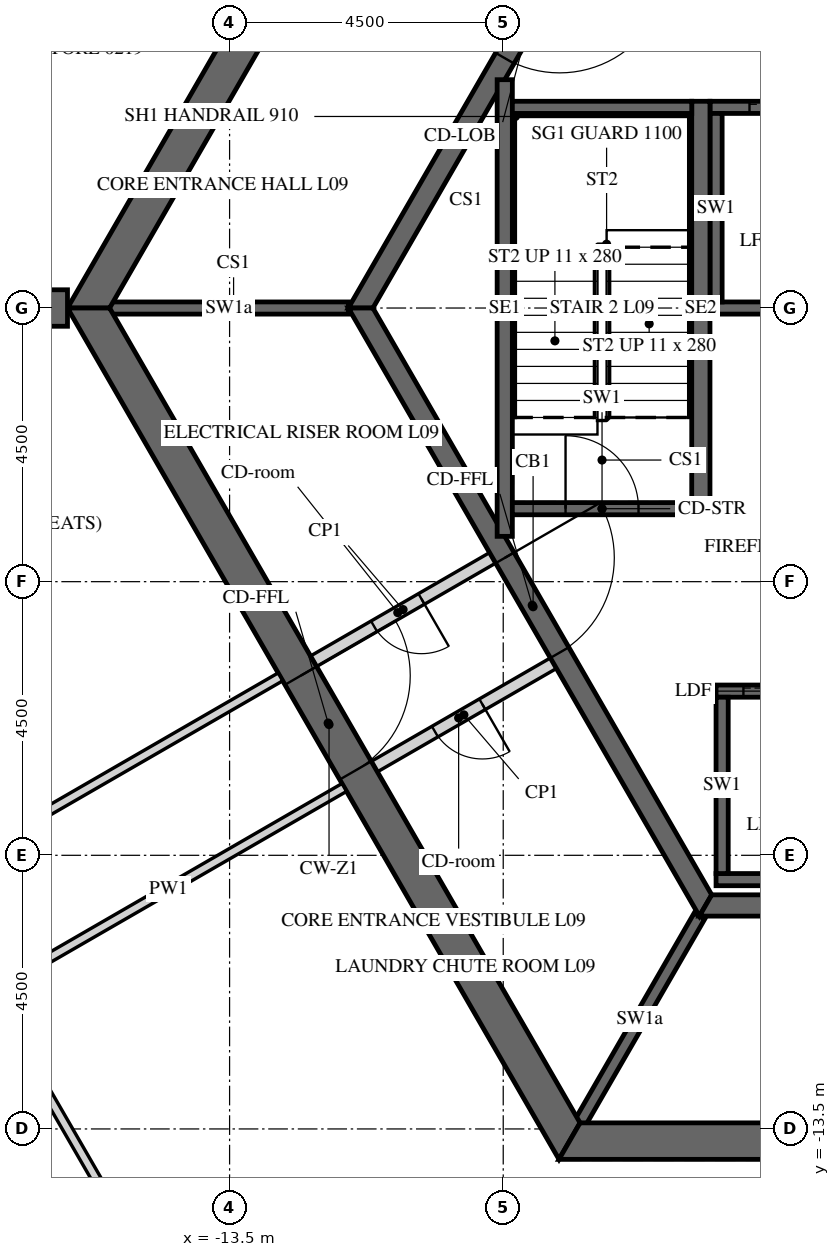
"""IFC4 building model, lengths in metres.
Left out: names, types, materials, properties, quantities, classifications, styles, units other than length and angle.
Written with IfcOpenShell. Run it as: python <this file> out.ifc"""

import sys

from ifc_helpers import new_model, si_unit, direction, frame, frame_2d, origin, place, context, subcontext, project, spatial, polyline, rectangle, outline, extrude, element, fill, save


model = new_model("IFC4")
c1 = context("Model", 3, precision=1e-05, world=origin(), true_north=direction((0.0, 1.0)))
c2 = subcontext(c1, "Body", "Model", "MODEL_VIEW")
j1 = project(units=[si_unit("LENGTHUNIT", "METRE"), si_unit("PLANEANGLEUNIT", "RADIAN")], contexts=[c1])
p1 = place(None, origin())
s1 = spatial("IfcSite", under=j1, at=p1, CompositionType="ELEMENT")
p2 = place(p1, origin())
s2 = spatial("IfcBuilding", under=s1, at=p2, CompositionType="ELEMENT")
p3 = place(p2, frame((0.0, 0.0, 49.2)))
s3 = spatial("IfcBuildingStorey", under=s2, at=p3, CompositionType="ELEMENT", Elevation=49.2)
p4 = place(p3, frame((-7.91, 13.7, -0.15), z_axis=(0.0, 0.0, 1.0), x_axis=(-0.499999880136, -0.866025472988, 0.0)))
e1 = element("IfcWall", 1, at=p4, inside=s3, PredefinedType="SHEAR", context=c2, shape_type="SweptSolid", body=[
    extrude(outline(polyline([(-0.173, -0.3), (15.993, -0.3), (15.646, 0.3), (0.173, 0.3), (-0.173, -0.3)])), origin(), (0.0, 0.0, 1.0), 3.9),
])
p5 = place(p4, frame((7.039, 0.0, 0.15)))
e2 = element("IfcOpeningElement", 2, at=p5, cuts=e1, PredefinedType="OPENING", context=c2, shape_type="SweptSolid", body=[
    extrude(rectangle(XDim=1.8, YDim=2.4, at=frame_2d((0.9, 1.2))), frame((0.0, 0.31, 0.0), z_axis=(0.0, -1.0, 0.0), x_axis=(1.0, 0.0, 0.0)), (0.0, 0.0, 1.0), 0.62),
])
p6 = place(p3, frame((-15.819, 0.0, -0.15), z_axis=(0.0, 0.0, 1.0), x_axis=(0.499999880136, -0.866025472988, 0.0)))
e3 = element("IfcWall", 3, at=p6, inside=s3, PredefinedType="SHEAR", context=c2, shape_type="SweptSolid", body=[
    extrude(outline(polyline([(-0.173, -0.3), (15.993, -0.3), (15.646, 0.3), (0.173, 0.3), (-0.173, -0.3)])), origin(), (0.0, 0.0, 1.0), 3.9),
])
p7 = place(p6, frame((6.981, 0.0, 0.15)))
e4 = element("IfcOpeningElement", 4, at=p7, cuts=e3, PredefinedType="OPENING", context=c2, shape_type="SweptSolid", body=[
    extrude(rectangle(XDim=1.8, YDim=2.4, at=frame_2d((0.9, 1.2))), frame((0.0, 0.31, 0.0), z_axis=(0.0, -1.0, 0.0), x_axis=(1.0, 0.0, 0.0)), (0.0, 0.0, 1.0), 0.62),
])
p8 = place(p3, frame((-7.91, -13.7, -0.15), z_axis=(0.0, 0.0, 1.0), x_axis=(1.0, 0.0, 0.0)))
e5 = element("IfcWall", 5, at=p8, inside=s3, PredefinedType="SHEAR", context=c2, shape_type="SweptSolid", body=[
    extrude(outline(polyline([(-0.173, -0.3), (15.993, -0.3), (15.646, 0.3), (0.173, 0.3), (-0.173, -0.3)])), origin(), (0.0, 0.0, 1.0), 3.9),
])
p9 = place(p8, frame((7.31, 0.0, 0.15)))
e6 = element("IfcOpeningElement", 6, at=p9, cuts=e5, PredefinedType="OPENING", context=c2, shape_type="SweptSolid", body=[
    extrude(rectangle(XDim=1.2, YDim=2.4, at=frame_2d((0.6, 1.2))), frame((0.0, 0.31, 0.0), z_axis=(0.0, -1.0, 0.0), x_axis=(1.0, 0.0, 0.0)), (0.0, 0.0, 1.0), 0.62),
])
p10 = place(p3, frame((-16.166, 0.0, -0.15), z_axis=(0.0, 0.0, 1.0), x_axis=(-1.0, 0.0, 0.0)))
e7 = element("IfcWall", 7, at=p10, inside=s3, PredefinedType="SHEAR", context=c2, shape_type="SweptSolid", body=[
    extrude(rectangle(XDim=16.509, YDim=0.6, at=frame_2d((8.254, 0.0))), origin(), (0.0, 0.0, 1.0), 3.9),
])
p11 = place(p10, frame((7.354, 0.0, 0.15)))
e8 = element("IfcOpeningElement", 8, at=p11, cuts=e7, PredefinedType="OPENING", context=c2, shape_type="SweptSolid", body=[
    extrude(rectangle(XDim=1.8, YDim=2.4, at=frame_2d((0.9, 1.2))), frame((0.0, 0.31, 0.0), z_axis=(0.0, -1.0, 0.0), x_axis=(1.0, 0.0, 0.0)), (0.0, 0.0, 1.0), 0.62),
])
p12 = place(p3, frame((-5.673, 9.825, -0.15), z_axis=(0.0, 0.0, 1.0), x_axis=(-0.499995046907, -0.866028263435, 0.0)))
e9 = element("IfcWall", 9, at=p12, inside=s3, PredefinedType="SHEAR", context=c2, shape_type="SweptSolid", body=[
    extrude(outline(polyline([(-0.101, -0.175), (11.446, -0.175), (11.244, 0.175), (0.101, 0.175), (-0.101, -0.175)])), origin(), (0.0, 0.0, 1.0), 3.9),
])
p13 = place(p12, frame((4.801, 0.0, 0.15)))
e10 = element("IfcOpeningElement", 10, at=p13, cuts=e9, PredefinedType="OPENING", context=c2, shape_type="SweptSolid", body=[
    extrude(rectangle(XDim=1.8, YDim=2.4, at=frame_2d((0.9, 1.2))), frame((0.0, 0.185, 0.0), z_axis=(0.0, -1.0, 0.0), x_axis=(1.0, 0.0, 0.0)), (0.0, 0.0, 1.0), 0.37),
])
p14 = place(p3, frame((-11.345, 0.0, -0.15), z_axis=(0.0, 0.0, 1.0), x_axis=(0.499995046907, -0.866028263435, 0.0)))
e11 = element("IfcWall", 11, at=p14, inside=s3, PredefinedType="SHEAR", context=c2, shape_type="SweptSolid", body=[
    extrude(outline(polyline([(-0.101, -0.175), (11.446, -0.175), (11.244, 0.175), (0.101, 0.175), (-0.101, -0.175)])), origin(), (0.0, 0.0, 1.0), 3.9),
])
p15 = place(p14, frame((4.744, 0.0, 0.15)))
e12 = element("IfcOpeningElement", 12, at=p15, cuts=e11, PredefinedType="OPENING", context=c2, shape_type="SweptSolid", body=[
    extrude(rectangle(XDim=1.8, YDim=2.4, at=frame_2d((0.9, 1.2))), frame((0.0, 0.185, 0.0), z_axis=(0.0, -1.0, 0.0), x_axis=(1.0, 0.0, 0.0)), (0.0, 0.0, 1.0), 0.37),
])
p16 = place(p3, frame((-5.673, -9.825, -0.15), z_axis=(0.0, 0.0, 1.0), x_axis=(1.0, 0.0, 0.0)))
e13 = element("IfcWall", 13, at=p16, inside=s3, PredefinedType="SHEAR", context=c2, shape_type="SweptSolid", body=[
    extrude(outline(polyline([(-0.101, -0.175), (11.446, -0.175), (11.244, 0.175), (0.101, 0.175), (-0.101, -0.175)])), origin(), (0.0, 0.0, 1.0), 3.9),
])
p17 = place(p3, frame((-5.6, 3.3, -0.25), z_axis=(0.0, 0.0, 1.0), x_axis=(1.0, 0.0, 0.0)))
e14 = element("IfcWall", 14, at=p17, inside=s3, PredefinedType="SHEAR", context=c2, shape_type="SweptSolid", body=[
    extrude(rectangle(XDim=11.2, YDim=0.2, at=frame_2d((5.6, 0.0))), origin(), (0.0, 0.0, 1.0), 3.9),
])
p18 = place(p17, frame((0.65, 0.0, 0.25)))
e15 = element("IfcOpeningElement", 15, at=p18, cuts=e14, PredefinedType="OPENING", context=c2, shape_type="SweptSolid", body=[
    extrude(rectangle(XDim=1.1, YDim=2.1, at=frame_2d((0.55, 1.05))), frame((0.0, 0.11, 0.0), z_axis=(0.0, -1.0, 0.0), x_axis=(1.0, 0.0, 0.0)), (0.0, 0.0, 1.0), 0.22),
])
p19 = place(p17, frame((2.85, 0.0, 0.25)))
e16 = element("IfcOpeningElement", 16, at=p19, cuts=e14, PredefinedType="OPENING", context=c2, shape_type="SweptSolid", body=[
    extrude(rectangle(XDim=1.1, YDim=2.1, at=frame_2d((0.55, 1.05))), frame((0.0, 0.11, 0.0), z_axis=(0.0, -1.0, 0.0), x_axis=(1.0, 0.0, 0.0)), (0.0, 0.0, 1.0), 0.22),
])
p20 = place(p17, frame((5.05, 0.0, 0.25)))
e17 = element("IfcOpeningElement", 17, at=p20, cuts=e14, PredefinedType="OPENING", context=c2, shape_type="SweptSolid", body=[
    extrude(rectangle(XDim=1.1, YDim=2.1, at=frame_2d((0.55, 1.05))), frame((0.0, 0.11, 0.0), z_axis=(0.0, -1.0, 0.0), x_axis=(1.0, 0.0, 0.0)), (0.0, 0.0, 1.0), 0.22),
])
p21 = place(p17, frame((7.25, 0.0, 0.25)))
e18 = element("IfcOpeningElement", 18, at=p21, cuts=e14, PredefinedType="OPENING", context=c2, shape_type="SweptSolid", body=[
    extrude(rectangle(XDim=1.1, YDim=2.1, at=frame_2d((0.55, 1.05))), frame((0.0, 0.11, 0.0), z_axis=(0.0, -1.0, 0.0), x_axis=(1.0, 0.0, 0.0)), (0.0, 0.0, 1.0), 0.22),
])
p22 = place(p17, frame((9.45, 0.0, 0.25)))
e19 = element("IfcOpeningElement", 19, at=p22, cuts=e14, PredefinedType="OPENING", context=c2, shape_type="SweptSolid", body=[
    extrude(rectangle(XDim=1.1, YDim=2.1, at=frame_2d((0.55, 1.05))), frame((0.0, 0.11, 0.0), z_axis=(0.0, -1.0, 0.0), x_axis=(1.0, 0.0, 0.0)), (0.0, 0.0, 1.0), 0.22),
])
p23 = place(p3, frame((-5.6, 0.0, -0.25), z_axis=(0.0, 0.0, 1.0), x_axis=(1.0, 0.0, 0.0)))
e20 = element("IfcWall", 20, at=p23, inside=s3, PredefinedType="SHEAR", context=c2, shape_type="SweptSolid", body=[
    extrude(rectangle(XDim=11.2, YDim=0.2, at=frame_2d((5.6, 0.0))), origin(), (0.0, 0.0, 1.0), 3.9),
])
p24 = place(p3, frame((-5.5, 0.1, -0.25), z_axis=(0.0, 0.0, 1.0), x_axis=(0.0, 1.0, 0.0)))
e21 = element("IfcWall", 21, at=p24, inside=s3, PredefinedType="SHEAR", context=c2, shape_type="SweptSolid", body=[
    extrude(rectangle(XDim=3.1, YDim=0.2, at=frame_2d((1.55, 0.0))), origin(), (0.0, 0.0, 1.0), 3.9),
])
p25 = place(p3, frame((-5.5, -6.3, -0.25), z_axis=(0.0, 0.0, 1.0), x_axis=(1.0, 0.0, 0.0)))
e22 = element("IfcWall", 22, at=p25, inside=s3, PredefinedType="SHEAR", context=c2, shape_type="SweptSolid", body=[
    extrude(rectangle(XDim=9.2, YDim=0.2, at=frame_2d((4.6, 0.0))), origin(), (0.0, 0.0, 1.0), 3.9),
])
p26 = place(p25, frame((0.45, 0.0, 0.25)))
e23 = element("IfcOpeningElement", 23, at=p26, cuts=e22, PredefinedType="OPENING", context=c2, shape_type="SweptSolid", body=[
    extrude(rectangle(XDim=1.1, YDim=2.1, at=frame_2d((0.55, 1.05))), frame((0.0, 0.11, 0.0), z_axis=(0.0, -1.0, 0.0), x_axis=(1.0, 0.0, 0.0)), (0.0, 0.0, 1.0), 0.22),
])
p27 = place(p25, frame((2.25, 0.0, 0.25)))
e24 = element("IfcOpeningElement", 24, at=p27, cuts=e22, PredefinedType="OPENING", context=c2, shape_type="SweptSolid", body=[
    extrude(rectangle(XDim=1.1, YDim=2.1, at=frame_2d((0.55, 1.05))), frame((0.0, 0.11, 0.0), z_axis=(0.0, -1.0, 0.0), x_axis=(1.0, 0.0, 0.0)), (0.0, 0.0, 1.0), 0.22),
])
p28 = place(p25, frame((4.05, 0.0, 0.25)))
e25 = element("IfcOpeningElement", 25, at=p28, cuts=e22, PredefinedType="OPENING", context=c2, shape_type="SweptSolid", body=[
    extrude(rectangle(XDim=1.1, YDim=2.1, at=frame_2d((0.55, 1.05))), frame((0.0, 0.11, 0.0), z_axis=(0.0, -1.0, 0.0), x_axis=(1.0, 0.0, 0.0)), (0.0, 0.0, 1.0), 0.22),
])
p29 = place(p25, frame((5.85, 0.0, 0.25)))
e26 = element("IfcOpeningElement", 26, at=p29, cuts=e22, PredefinedType="OPENING", context=c2, shape_type="SweptSolid", body=[
    extrude(rectangle(XDim=1.1, YDim=2.1, at=frame_2d((0.55, 1.05))), frame((0.0, 0.11, 0.0), z_axis=(0.0, -1.0, 0.0), x_axis=(1.0, 0.0, 0.0)), (0.0, 0.0, 1.0), 0.22),
])
p30 = place(p25, frame((7.65, 0.0, 0.25)))
e27 = element("IfcOpeningElement", 27, at=p30, cuts=e22, PredefinedType="OPENING", context=c2, shape_type="SweptSolid", body=[
    extrude(rectangle(XDim=1.1, YDim=2.1, at=frame_2d((0.55, 1.05))), frame((0.0, 0.11, 0.0), z_axis=(0.0, -1.0, 0.0), x_axis=(1.0, 0.0, 0.0)), (0.0, 0.0, 1.0), 0.22),
])
p31 = place(p3, frame((-5.5, -9.4, -0.25), z_axis=(0.0, 0.0, 1.0), x_axis=(1.0, 0.0, 0.0)))
e28 = element("IfcWall", 28, at=p31, inside=s3, PredefinedType="SHEAR", context=c2, shape_type="SweptSolid", body=[
    extrude(rectangle(XDim=9.2, YDim=0.2, at=frame_2d((4.6, 0.0))), origin(), (0.0, 0.0, 1.0), 3.9),
])
p32 = place(p3, frame((-5.4, -9.3, -0.25), z_axis=(0.0, 0.0, 1.0), x_axis=(0.0, 1.0, 0.0)))
e29 = element("IfcWall", 29, at=p32, inside=s3, PredefinedType="SHEAR", context=c2, shape_type="SweptSolid", body=[
    extrude(rectangle(XDim=2.9, YDim=0.2, at=frame_2d((1.45, 0.0))), origin(), (0.0, 0.0, 1.0), 3.9),
])
p33 = place(p3, frame((-11.547, 0.0, -0.15), z_axis=(0.0, 0.0, 1.0), x_axis=(-1.0, 0.0, 0.0)))
e30 = element("IfcWall", 30, at=p33, inside=s3, PredefinedType="SHEAR", context=c2, shape_type="SweptSolid", body=[
    extrude(rectangle(XDim=3.926, YDim=0.2, at=frame_2d((1.963, 0.0))), origin(), (0.0, 0.0, 1.0), 3.9),
])
p34 = place(p3, frame((-5.773, -10.0, -0.15), z_axis=(0.0, 0.0, 1.0), x_axis=(-0.500038251005, -0.86600331843, 0.0)))
e31 = element("IfcWall", 31, at=p34, inside=s3, PredefinedType="SHEAR", context=c2, shape_type="SweptSolid", body=[
    extrude(rectangle(XDim=3.926, YDim=0.2, at=frame_2d((1.963, 0.0))), origin(), (0.0, 0.0, 1.0), 3.9),
])
p35 = place(p3, frame((-8.175, -5.841, 0.0), z_axis=(0.0, 0.0, 1.0), x_axis=(-0.866020560687, -0.500008388397, 0.0)))
e32 = element("IfcWall", 32, at=p35, inside=s3, PredefinedType="PARTITIONING", context=c2, shape_type="SweptSolid", body=[
    extrude(rectangle(XDim=3.4, YDim=0.2, at=frame_2d((1.7, 0.0))), origin(), (0.0, 0.0, 1.0), 3.65),
])
p36 = place(p35, frame((1.35, 0.0, 0.0)))
e33 = element("IfcOpeningElement", 33, at=p36, cuts=e32, PredefinedType="OPENING", context=c2, shape_type="SweptSolid", body=[
    extrude(rectangle(XDim=0.9, YDim=2.1, at=frame_2d((0.45, 1.05))), frame((0.0, 0.11, 0.0), z_axis=(0.0, -1.0, 0.0), x_axis=(1.0, 0.0, 0.0)), (0.0, 0.0, 1.0), 0.22),
])
p37 = place(p3, frame((-9.175, -4.109, 0.0), z_axis=(0.0, 0.0, 1.0), x_axis=(-0.865989465428, -0.500062241894, 0.0)))
e34 = element("IfcWall", 34, at=p37, inside=s3, PredefinedType="PARTITIONING", context=c2, shape_type="SweptSolid", body=[
    extrude(rectangle(XDim=3.4, YDim=0.2, at=frame_2d((1.7, 0.0))), origin(), (0.0, 0.0, 1.0), 3.65),
])
p38 = place(p37, frame((1.351, 0.0, 0.0)))
e35 = element("IfcOpeningElement", 35, at=p38, cuts=e34, PredefinedType="OPENING", context=c2, shape_type="SweptSolid", body=[
    extrude(rectangle(XDim=0.9, YDim=2.1, at=frame_2d((0.45, 1.05))), frame((0.0, 0.11, 0.0), z_axis=(0.0, -1.0, 0.0), x_axis=(1.0, 0.0, 0.0)), (0.0, 0.0, 1.0), 0.22),
])
p39 = place(p3, frame((-5.75, -3.4, -0.25), z_axis=(0.0, 0.0, 1.0), x_axis=(0.0, 1.0, 0.0)))
e36 = element("IfcWall", 36, at=p39, inside=s3, PredefinedType="SHEAR", context=c2, shape_type="SweptSolid", body=[
    extrude(rectangle(XDim=6.8, YDim=0.3, at=frame_2d((3.4, 0.0))), origin(), (0.0, 0.0, 1.0), 3.9),
])
p40 = place(p3, frame((-8.975, -3.755, -0.25), z_axis=(0.0, 0.0, 1.0), x_axis=(0.0, 1.0, 0.0)))
e37 = element("IfcWall", 37, at=p40, inside=s3, PredefinedType="SHEAR", context=c2, shape_type="SweptSolid", body=[
    extrude(rectangle(XDim=7.51, YDim=0.25, at=frame_2d((3.755, 0.0))), origin(), (0.0, 0.0, 1.0), 3.9),
])
p41 = place(p3, frame((-8.85, 3.3, -0.25), z_axis=(0.0, 0.0, 1.0), x_axis=(1.0, 0.0, 0.0)))
e38 = element("IfcWall", 38, at=p41, inside=s3, PredefinedType="SHEAR", context=c2, shape_type="SweptSolid", body=[
    extrude(rectangle(XDim=2.95, YDim=0.2, at=frame_2d((1.475, 0.0))), origin(), (0.0, 0.0, 1.0), 3.9),
])
p42 = place(p3, frame((-8.85, -3.3, -0.25), z_axis=(0.0, 0.0, 1.0), x_axis=(1.0, 0.0, 0.0)))
e39 = element("IfcWall", 39, at=p42, inside=s3, PredefinedType="SHEAR", context=c2, shape_type="SweptSolid", body=[
    extrude(rectangle(XDim=2.95, YDim=0.2, at=frame_2d((1.475, 0.0))), origin(), (0.0, 0.0, 1.0), 3.9),
])
p43 = place(p42, frame((0.875, 0.0, 0.25)))
e40 = element("IfcOpeningElement", 40, at=p43, cuts=e39, PredefinedType="OPENING", context=c2, shape_type="SweptSolid", body=[
    extrude(rectangle(XDim=1.2, YDim=2.4, at=frame_2d((0.6, 1.2))), frame((0.0, 0.11, 0.0), z_axis=(0.0, -1.0, 0.0), x_axis=(1.0, 0.0, 0.0)), (0.0, 0.0, 1.0), 0.22),
])
p44 = place(p3, frame((-14.127, 22.475, 0.0), z_axis=(0.0, 0.0, 1.0), x_axis=(-0.438366981459, -0.898796077855, 0.0)))
e41 = element("IfcWall", 41, at=p44, inside=s3, PredefinedType="PARTITIONING", context=c2, shape_type="SweptSolid", body=[
    extrude(rectangle(XDim=22.586, YDim=0.15, at=frame_2d((11.293, 0.0))), origin(), (0.0, 0.0, 1.0), 2.988),
])
p45 = place(p44, frame((4.656, 0.0, 0.0)))
e42 = element("IfcOpeningElement", 42, at=p45, cuts=e41, PredefinedType="OPENING", context=c2, shape_type="SweptSolid", body=[
    extrude(rectangle(XDim=1.0, YDim=2.1, at=frame_2d((0.5, 1.05))), frame((0.0, 0.085, 0.0), z_axis=(0.0, -1.0, 0.0), x_axis=(1.0, 0.0, 0.0)), (0.0, 0.0, 1.0), 0.17),
])
p46 = place(p44, frame((16.033, 0.0, 0.0)))
e43 = element("IfcOpeningElement", 43, at=p46, cuts=e41, PredefinedType="OPENING", context=c2, shape_type="SweptSolid", body=[
    extrude(rectangle(XDim=1.0, YDim=2.1, at=frame_2d((0.5, 1.05))), frame((0.0, 0.085, 0.0), z_axis=(0.0, -1.0, 0.0), x_axis=(1.0, 0.0, 0.0)), (0.0, 0.0, 1.0), 0.17),
])
p47 = place(p3, frame((-24.783, -2.175, 0.0), z_axis=(0.0, 0.0, 1.0), x_axis=(0.500001098408, -0.866024769617, 0.0)))
e44 = element("IfcWall", 44, at=p47, inside=s3, PredefinedType="PARTITIONING", context=c2, shape_type="SweptSolid", body=[
    extrude(rectangle(XDim=24.599, YDim=0.15, at=frame_2d((12.299, 0.0))), origin(), (0.0, 0.0, 1.0), 2.988),
])
p48 = place(p47, frame((2.816, 0.0, 0.0)))
e45 = element("IfcOpeningElement", 45, at=p48, cuts=e44, PredefinedType="OPENING", context=c2, shape_type="SweptSolid", body=[
    extrude(rectangle(XDim=1.0, YDim=2.1, at=frame_2d((0.5, 1.05))), frame((0.0, 0.085, 0.0), z_axis=(0.0, -1.0, 0.0), x_axis=(1.0, 0.0, 0.0)), (0.0, 0.0, 1.0), 0.17),
])
p49 = place(p47, frame((8.919, 0.0, 0.0)))
e46 = element("IfcOpeningElement", 46, at=p49, cuts=e44, PredefinedType="OPENING", context=c2, shape_type="SweptSolid", body=[
    extrude(rectangle(XDim=1.0, YDim=2.1, at=frame_2d((0.5, 1.05))), frame((0.0, 0.085, 0.0), z_axis=(0.0, -1.0, 0.0), x_axis=(1.0, 0.0, 0.0)), (0.0, 0.0, 1.0), 0.17),
])
p50 = place(p47, frame((16.269, 0.0, 0.0)))
e47 = element("IfcOpeningElement", 47, at=p50, cuts=e44, PredefinedType="OPENING", context=c2, shape_type="SweptSolid", body=[
    extrude(rectangle(XDim=1.0, YDim=2.1, at=frame_2d((0.5, 1.05))), frame((0.0, 0.085, 0.0), z_axis=(0.0, -1.0, 0.0), x_axis=(1.0, 0.0, 0.0)), (0.0, 0.0, 1.0), 0.17),
])
p51 = place(p47, frame((19.809, 0.0, 0.0)))
e48 = element("IfcOpeningElement", 48, at=p51, cuts=e44, PredefinedType="OPENING", context=c2, shape_type="SweptSolid", body=[
    extrude(rectangle(XDim=1.0, YDim=2.1, at=frame_2d((0.5, 1.05))), frame((0.0, 0.085, 0.0), z_axis=(0.0, -1.0, 0.0), x_axis=(1.0, 0.0, 0.0)), (0.0, 0.0, 1.0), 0.17),
])
p52 = place(p3, frame((-12.664, -6.066, 0.0), z_axis=(0.0, 0.0, 1.0), x_axis=(-0.866026575979, -0.499997969693, 0.0)))
e49 = element("IfcWall", 49, at=p52, inside=s3, PredefinedType="PARTITIONING", context=c2, shape_type="SweptSolid", body=[
    extrude(rectangle(XDim=6.75, YDim=0.15, at=frame_2d((3.375, 0.0))), origin(), (0.0, 0.0, 1.0), 2.988),
])
p53 = place(p3, frame((-11.529, -21.532, 0.0), z_axis=(0.0, 0.0, 1.0), x_axis=(-0.499990893337, 0.866030661455, 0.0)))
e50 = element("IfcWall", 50, at=p53, inside=s3, PredefinedType="PARTITIONING", context=c2, shape_type="SweptSolid", body=[
    extrude(rectangle(XDim=11.862, YDim=0.15, at=frame_2d((5.931, 0.0))), origin(), (0.0, 0.0, 1.0), 2.988),
])
p54 = place(p53, frame((5.481, 0.0, 0.0)))
e51 = element("IfcOpeningElement", 51, at=p54, cuts=e50, PredefinedType="OPENING", context=c2, shape_type="SweptSolid", body=[
    extrude(rectangle(XDim=0.9, YDim=2.1, at=frame_2d((0.45, 1.05))), frame((0.0, 0.085, 0.0), z_axis=(0.0, -1.0, 0.0), x_axis=(1.0, 0.0, 0.0)), (0.0, 0.0, 1.0), 0.17),
])
p55 = place(p3, frame((-17.395, -11.222, 0.0), z_axis=(0.0, 0.0, 1.0), x_axis=(0.86601747984, 0.500013724423, 0.0)))
e52 = element("IfcWall", 52, at=p55, inside=s3, PredefinedType="PARTITIONING", context=c2, shape_type="SweptSolid", body=[
    extrude(rectangle(XDim=6.675, YDim=0.15, at=frame_2d((3.337, 0.0))), origin(), (0.0, 0.0, 1.0), 2.988),
])
p56 = place(p7, origin())
e53 = element("IfcDoor", 53, at=p56, inside=s3, OperationType="DOUBLE_DOOR_SINGLE_SWING", PredefinedType="DOOR", context=c2, shape_type="SweptSolid", body=[
    extrude(rectangle(XDim=1.8, YDim=2.4, at=frame_2d((0.9, 1.2))), frame((0.0, 0.025, 0.0), z_axis=(0.0, -1.0, 0.0), x_axis=(1.0, 0.0, 0.0)), (0.0, 0.0, 1.0), 0.05),
])
fill(e4, e53)
p57 = place(p13, origin())
e54 = element("IfcDoor", 54, at=p57, inside=s3, OperationType="DOUBLE_DOOR_SINGLE_SWING", PredefinedType="DOOR", context=c2, shape_type="SweptSolid", body=[
    extrude(rectangle(XDim=1.8, YDim=2.4, at=frame_2d((0.9, 1.2))), frame((0.0, 0.025, 0.0), z_axis=(0.0, -1.0, 0.0), x_axis=(1.0, 0.0, 0.0)), (0.0, 0.0, 1.0), 0.05),
])
fill(e10, e54)
p58 = place(p15, origin())
e55 = element("IfcDoor", 55, at=p58, inside=s3, OperationType="DOUBLE_DOOR_SINGLE_SWING", PredefinedType="DOOR", context=c2, shape_type="SweptSolid", body=[
    extrude(rectangle(XDim=1.8, YDim=2.4, at=frame_2d((0.9, 1.2))), frame((0.0, 0.025, 0.0), z_axis=(0.0, -1.0, 0.0), x_axis=(1.0, 0.0, 0.0)), (0.0, 0.0, 1.0), 0.05),
])
fill(e12, e55)
p59 = place(p36, origin())
e56 = element("IfcDoor", 56, at=p59, inside=s3, OperationType="SINGLE_SWING_LEFT", PredefinedType="DOOR", context=c2, shape_type="SweptSolid", body=[
    extrude(rectangle(XDim=0.9, YDim=2.1, at=frame_2d((0.45, 1.05))), frame((0.0, 0.025, 0.0), z_axis=(0.0, -1.0, 0.0), x_axis=(1.0, 0.0, 0.0)), (0.0, 0.0, 1.0), 0.05),
])
fill(e33, e56)
p60 = place(p38, origin())
e57 = element("IfcDoor", 57, at=p60, inside=s3, OperationType="SINGLE_SWING_LEFT", PredefinedType="DOOR", context=c2, shape_type="SweptSolid", body=[
    extrude(rectangle(XDim=0.9, YDim=2.1, at=frame_2d((0.45, 1.05))), frame((0.0, 0.025, 0.0), z_axis=(0.0, -1.0, 0.0), x_axis=(1.0, 0.0, 0.0)), (0.0, 0.0, 1.0), 0.05),
])
fill(e35, e57)
p61 = place(p43, origin())
e58 = element("IfcDoor", 58, at=p61, inside=s3, OperationType="SINGLE_SWING_LEFT", PredefinedType="DOOR", context=c2, shape_type="SweptSolid", body=[
    extrude(rectangle(XDim=1.2, YDim=2.4, at=frame_2d((0.6, 1.2))), frame((0.0, 0.025, 0.0), z_axis=(0.0, -1.0, 0.0), x_axis=(1.0, 0.0, 0.0)), (0.0, 0.0, 1.0), 0.05),
])
fill(e40, e58)
p62 = place(p18, origin())
e59 = element("IfcDoor", 59, at=p62, inside=s3, OperationType="SLIDING_TO_LEFT", PredefinedType="DOOR", context=c2, shape_type="SweptSolid", body=[
    extrude(rectangle(XDim=1.1, YDim=2.1, at=frame_2d((0.55, 1.05))), frame((0.0, 0.025, 0.0), z_axis=(0.0, -1.0, 0.0), x_axis=(1.0, 0.0, 0.0)), (0.0, 0.0, 1.0), 0.05),
])
fill(e15, e59)
p63 = place(p26, origin())
e60 = element("IfcDoor", 60, at=p63, inside=s3, OperationType="SLIDING_TO_LEFT", PredefinedType="DOOR", context=c2, shape_type="SweptSolid", body=[
    extrude(rectangle(XDim=1.1, YDim=2.1, at=frame_2d((0.55, 1.05))), frame((0.0, 0.025, 0.0), z_axis=(0.0, -1.0, 0.0), x_axis=(1.0, 0.0, 0.0)), (0.0, 0.0, 1.0), 0.05),
])
fill(e23, e60)
save(model, sys.argv[1])
